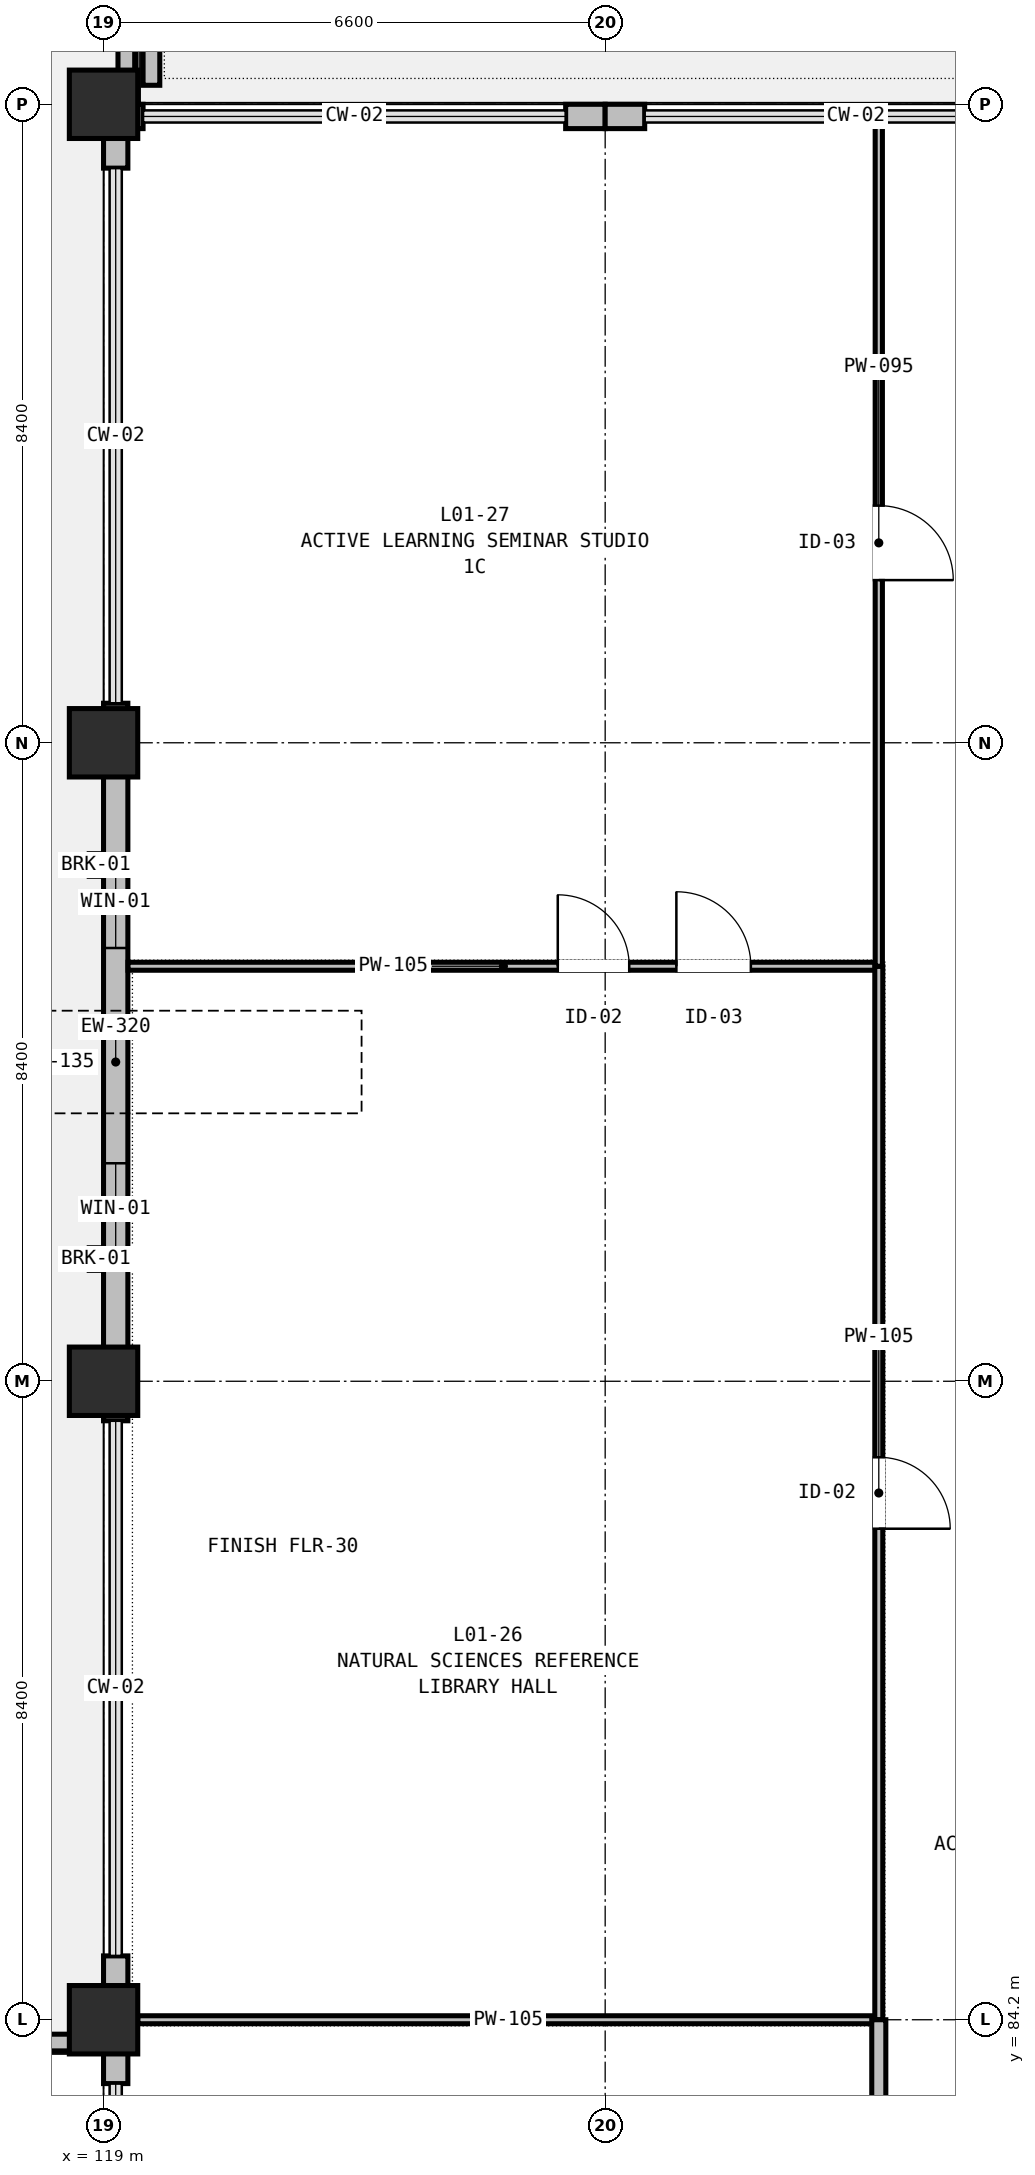
"""IFC4 building model, lengths in metres.
Left out: names, types, materials, properties, quantities, classifications, styles, units other than length and angle.
Written with IfcOpenShell. Run it as: python <this file> out.ifc"""

import sys

from ifc_helpers import new_model, si_unit, direction, frame, frame_2d, origin, origin_2d, place, context, subcontext, project, spatial, rectangle, extrude, element, fill, save


model = new_model("IFC4")
c1 = context("Model", 3, precision=1e-05, world=origin(), true_north=direction((0.0, 1.0)))
c2 = subcontext(c1, "Body", "Model", "MODEL_VIEW")
j1 = project(units=[si_unit("LENGTHUNIT", "METRE"), si_unit("PLANEANGLEUNIT", "RADIAN")], contexts=[c1])
p1 = place(None, origin())
s1 = spatial("IfcSite", under=j1, at=p1, CompositionType="ELEMENT")
p2 = place(p1, origin())
s2 = spatial("IfcBuilding", under=s1, at=p2, CompositionType="ELEMENT")
p3 = place(p2, frame((0.0, 0.0, 5.4)))
s3 = spatial("IfcBuildingStorey", under=s2, at=p3, CompositionType="ELEMENT", Elevation=5.4)
for number, where, z_axis, x_axis in (
    (1, (119.0, 84.2, 0.0), (0.0, 0.0, 1.0), (1.0, 0.0, 0.0)),
    (2, (119.0, 92.6, 0.0), (0.0, 0.0, 1.0), (1.0, 0.0, 0.0)),
    (3, (119.0, 101.0, 0.0), (0.0, 0.0, 1.0), (1.0, 0.0, 0.0)),
    (4, (119.0, 109.4, 0.0), (0.0, 0.0, 1.0), (1.0, 0.0, 0.0)),
):
    element("IfcColumn", number, at=place(p3, frame(where, z_axis=z_axis, x_axis=x_axis)), inside=s3, PredefinedType="COLUMN", context=c2, shape_type="SweptSolid", body=[
        extrude(rectangle(XDim=0.9, YDim=0.9, at=origin_2d()), origin(), (0.0, 0.0, 1.0), 4.8),
    ])
p4 = place(p3, frame((119.16, 83.36, 0.0), z_axis=(0.0, 0.0, 1.0), x_axis=(0.0, 1.0, 0.0)))
e5 = element("IfcWall", 5, at=p4, inside=s3, PredefinedType="STANDARD", context=c2, shape_type="SweptSolid", body=[
    extrude(rectangle(XDim=0.52, YDim=0.32, at=frame_2d((0.26, 0.0))), origin(), (0.0, 0.0, 1.0), 3.385),
])
for number, where, z_axis, x_axis in (
    (6, (119.16, 84.52, 0.0), (0.0, 0.0, 1.0), (0.0, 1.0, 0.0)),
    (7, (119.16, 92.08, 0.0), (0.0, 0.0, 1.0), (0.0, 1.0, 0.0)),
):
    element("IfcWall", number, at=place(p3, frame(where, z_axis=z_axis, x_axis=x_axis)), inside=s3, PredefinedType="STANDARD", context=c2, shape_type="SweptSolid", body=[
        extrude(rectangle(XDim=0.52, YDim=0.32, at=frame_2d((0.26, 0.0))), origin(), (0.0, 0.0, 1.0), 3.385),
    ])
p5 = place(p3, frame((119.16, 92.6, 0.0), z_axis=(0.0, 0.0, 1.0), x_axis=(0.0, 1.0, 0.0)))
e8 = element("IfcWall", 8, at=p5, inside=s3, PredefinedType="STANDARD", context=c2, shape_type="SweptSolid", body=[
    extrude(rectangle(XDim=8.4, YDim=0.32, at=frame_2d((4.2, 0.0))), origin(), (0.0, 0.0, 1.0), 3.385),
])
p6 = place(p5, frame((1.668, 0.0, 0.9)))
e9 = element("IfcOpeningElement", 9, at=p6, cuts=e8, PredefinedType="OPENING", context=c2, shape_type="SweptSolid", body=[
    extrude(rectangle(XDim=1.2, YDim=2.1, at=frame_2d((0.6, 1.05))), frame((0.0, 0.17, 0.0), z_axis=(0.0, -1.0, 0.0), x_axis=(1.0, 0.0, 0.0)), (0.0, 0.0, 1.0), 0.34),
])
p7 = place(p5, frame((5.7, 0.0, 0.9)))
e10 = element("IfcOpeningElement", 10, at=p7, cuts=e8, PredefinedType="OPENING", context=c2, shape_type="SweptSolid", body=[
    extrude(rectangle(XDim=1.2, YDim=2.1, at=frame_2d((0.6, 1.05))), frame((0.0, 0.17, 0.0), z_axis=(0.0, -1.0, 0.0), x_axis=(1.0, 0.0, 0.0)), (0.0, 0.0, 1.0), 0.34),
])
for number, where, z_axis, x_axis in (
    (11, (119.16, 101.0, 0.0), (0.0, 0.0, 1.0), (0.0, 1.0, 0.0)),
    (12, (119.16, 108.56, 0.0), (0.0, 0.0, 1.0), (0.0, 1.0, 0.0)),
    (13, (119.0, 109.24, 0.0), (0.0, 0.0, 1.0), (1.0, 0.0, 0.0)),
    (14, (125.08, 109.24, 0.0), (0.0, 0.0, 1.0), (1.0, 0.0, 0.0)),
    (15, (125.6, 109.24, 0.0), (0.0, 0.0, 1.0), (1.0, 0.0, 0.0)),
):
    element("IfcWall", number, at=place(p3, frame(where, z_axis=z_axis, x_axis=x_axis)), inside=s3, PredefinedType="STANDARD", context=c2, shape_type="SweptSolid", body=[
        extrude(rectangle(XDim=0.52, YDim=0.32, at=frame_2d((0.26, 0.0))), origin(), (0.0, 0.0, 1.0), 3.385),
    ])
p8 = place(p3, frame((119.3, 118.33, 0.0), z_axis=(0.0, 0.0, 1.0), x_axis=(0.0, -1.0, 0.0)))
e16 = element("IfcWall", 16, at=p8, inside=s3, PredefinedType="PARAPET", context=c2, shape_type="SweptSolid", body=[
    extrude(rectangle(XDim=8.75, YDim=0.22, at=frame_2d((4.375, 0.0))), origin(), (0.0, 0.0, 1.0), 0.85),
])
p9 = place(p3, frame((118.82, 83.9, 0.0), z_axis=(0.0, 0.0, 1.0), x_axis=(-1.0, 0.0, 0.0)))
e17 = element("IfcWall", 17, at=p9, inside=s3, PredefinedType="PARAPET", context=c2, shape_type="SweptSolid", body=[
    extrude(rectangle(XDim=12.84, YDim=0.22, at=frame_2d((6.42, 0.0))), origin(), (0.0, 0.0, 1.0), 0.85),
])
p10 = place(p3, frame((119.63, 109.65, 0.0), z_axis=(0.0, 0.0, 1.0), x_axis=(0.0, 1.0, 0.0)))
e18 = element("IfcWall", 18, at=p10, inside=s3, PredefinedType="PARAPET", context=c2, shape_type="SweptSolid", body=[
    extrude(rectangle(XDim=8.63, YDim=0.22, at=frame_2d((4.315, 0.0))), origin(), (0.0, 0.0, 1.0), 0.68),
])
p11 = place(p3, frame((129.2, 84.2, 0.0), z_axis=(0.0, 0.0, 1.0), x_axis=(-1.0, 0.0, 0.0)))
e19 = element("IfcWall", 19, at=p11, inside=s3, PredefinedType="PARTITIONING", context=c2, shape_type="SweptSolid", body=[
    extrude(rectangle(XDim=9.75, YDim=0.105, at=frame_2d((4.875, 0.0))), origin(), (0.0, 0.0, 1.0), 3.385),
])
p12 = place(p3, frame((119.322, 98.06, 0.0), z_axis=(0.0, 0.0, 1.0), x_axis=(1.0, 0.0, 0.0)))
e20 = element("IfcWall", 20, at=p12, inside=s3, PredefinedType="PARTITIONING", context=c2, shape_type="SweptSolid", body=[
    extrude(rectangle(XDim=9.878, YDim=0.105, at=frame_2d((4.939, 0.0))), origin(), (0.0, 0.0, 1.0), 3.935),
])
p13 = place(p12, frame((5.654, 0.0, 0.0)))
e21 = element("IfcOpeningElement", 21, at=p13, cuts=e20, PredefinedType="OPENING", context=c2, shape_type="SweptSolid", body=[
    extrude(rectangle(XDim=0.94, YDim=2.02, at=frame_2d((0.47, 1.01))), frame((0.0, 0.062, 0.0), z_axis=(0.0, -1.0, 0.0), x_axis=(1.0, 0.0, 0.0)), (0.0, 0.0, 1.0), 0.125),
])
p14 = place(p12, frame((7.215, 0.0, 0.0)))
e22 = element("IfcOpeningElement", 22, at=p14, cuts=e20, PredefinedType="OPENING", context=c2, shape_type="SweptSolid", body=[
    extrude(rectangle(XDim=0.98, YDim=2.02, at=frame_2d((0.49, 1.01))), frame((0.0, 0.062, 0.0), z_axis=(0.0, -1.0, 0.0), x_axis=(1.0, 0.0, 0.0)), (0.0, 0.0, 1.0), 0.125),
])
p15 = place(p3, frame((129.2, 98.06, 0.0), z_axis=(0.0, 0.0, 1.0), x_axis=(0.0, -1.0, 0.0)))
e23 = element("IfcWall", 23, at=p15, inside=s3, PredefinedType="PARTITIONING", context=c2, shape_type="SweptSolid", body=[
    extrude(rectangle(XDim=13.86, YDim=0.105, at=frame_2d((6.93, 0.0))), origin(), (0.0, 0.0, 1.0), 3.385),
])
p16 = place(p15, frame((6.46, 0.0, 0.0)))
e24 = element("IfcOpeningElement", 24, at=p16, cuts=e23, PredefinedType="OPENING", context=c2, shape_type="SweptSolid", body=[
    extrude(rectangle(XDim=0.94, YDim=2.02, at=frame_2d((0.47, 1.01))), frame((0.0, 0.062, 0.0), z_axis=(0.0, -1.0, 0.0), x_axis=(1.0, 0.0, 0.0)), (0.0, 0.0, 1.0), 0.125),
])
p17 = place(p3, frame((129.2, 109.2, 0.0), z_axis=(0.0, 0.0, 1.0), x_axis=(0.0, -1.0, 0.0)))
e25 = element("IfcWall", 25, at=p17, inside=s3, PredefinedType="PARTITIONING", context=c2, shape_type="SweptSolid", body=[
    extrude(rectangle(XDim=11.14, YDim=0.095, at=frame_2d((5.57, 0.0))), origin(), (0.0, 0.0, 1.0), 3.385),
])
p18 = place(p17, frame((5.08, 0.0, 0.0)))
e26 = element("IfcOpeningElement", 26, at=p18, cuts=e25, PredefinedType="OPENING", context=c2, shape_type="SweptSolid", body=[
    extrude(rectangle(XDim=0.98, YDim=2.02, at=frame_2d((0.49, 1.01))), frame((0.0, 0.057, 0.0), z_axis=(0.0, -1.0, 0.0), x_axis=(1.0, 0.0, 0.0)), (0.0, 0.0, 1.0), 0.115),
])
p19 = place(p3, frame((129.2, 84.2, 0.0), z_axis=(0.0, 0.0, 1.0), x_axis=(0.0, -1.0, 0.0)))
e27 = element("IfcWall", 27, at=p19, inside=s3, PredefinedType="PARTITIONING", context=c2, shape_type="SweptSolid", body=[
    extrude(rectangle(XDim=8.8, YDim=0.185, at=frame_2d((4.4, 0.0))), origin(), (0.0, 0.0, 1.0), 3.385),
])
p20 = place(p6, origin())
e28 = element("IfcWindow", 28, at=p20, inside=s3, PartitioningType="SINGLE_PANEL", PredefinedType="WINDOW", context=c2, shape_type="SweptSolid", body=[
    extrude(rectangle(XDim=1.2, YDim=2.1, at=frame_2d((0.6, 1.05))), frame((0.0, 0.03, 0.0), z_axis=(0.0, -1.0, 0.0), x_axis=(1.0, 0.0, 0.0)), (0.0, 0.0, 1.0), 0.06),
])
fill(e9, e28)
p21 = place(p7, origin())
e29 = element("IfcWindow", 29, at=p21, inside=s3, PartitioningType="SINGLE_PANEL", PredefinedType="WINDOW", context=c2, shape_type="SweptSolid", body=[
    extrude(rectangle(XDim=1.2, YDim=2.1, at=frame_2d((0.6, 1.05))), frame((0.0, 0.03, 0.0), z_axis=(0.0, -1.0, 0.0), x_axis=(1.0, 0.0, 0.0)), (0.0, 0.0, 1.0), 0.06),
])
fill(e10, e29)
p22 = place(p16, origin())
e30 = element("IfcDoor", 30, at=p22, inside=s3, OperationType="SINGLE_SWING_RIGHT", PredefinedType="DOOR", context=c2, shape_type="SweptSolid", body=[
    extrude(rectangle(XDim=0.94, YDim=2.02, at=frame_2d((0.47, 1.01))), frame((0.0, 0.025, 0.0), z_axis=(0.0, -1.0, 0.0), x_axis=(1.0, 0.0, 0.0)), (0.0, 0.0, 1.0), 0.05),
])
fill(e24, e30)
p23 = place(p13, origin())
e31 = element("IfcDoor", 31, at=p23, inside=s3, OperationType="SINGLE_SWING_LEFT", PredefinedType="DOOR", context=c2, shape_type="SweptSolid", body=[
    extrude(rectangle(XDim=0.94, YDim=2.02, at=frame_2d((0.47, 1.01))), frame((0.0, 0.025, 0.0), z_axis=(0.0, -1.0, 0.0), x_axis=(1.0, 0.0, 0.0)), (0.0, 0.0, 1.0), 0.05),
])
fill(e21, e31)
p24 = place(p18, origin())
e32 = element("IfcDoor", 32, at=p24, inside=s3, OperationType="SINGLE_SWING_RIGHT", PredefinedType="DOOR", context=c2, shape_type="SweptSolid", body=[
    extrude(rectangle(XDim=0.98, YDim=2.02, at=frame_2d((0.49, 1.01))), frame((0.0, 0.025, 0.0), z_axis=(0.0, -1.0, 0.0), x_axis=(1.0, 0.0, 0.0)), (0.0, 0.0, 1.0), 0.05),
])
fill(e26, e32)
p25 = place(p14, origin())
e33 = element("IfcDoor", 33, at=p25, inside=s3, OperationType="SINGLE_SWING_LEFT", PredefinedType="DOOR", context=c2, shape_type="SweptSolid", body=[
    extrude(rectangle(XDim=0.98, YDim=2.02, at=frame_2d((0.49, 1.01))), frame((0.0, 0.025, 0.0), z_axis=(0.0, -1.0, 0.0), x_axis=(1.0, 0.0, 0.0)), (0.0, 0.0, 1.0), 0.05),
])
fill(e22, e33)
save(model, sys.argv[1])
